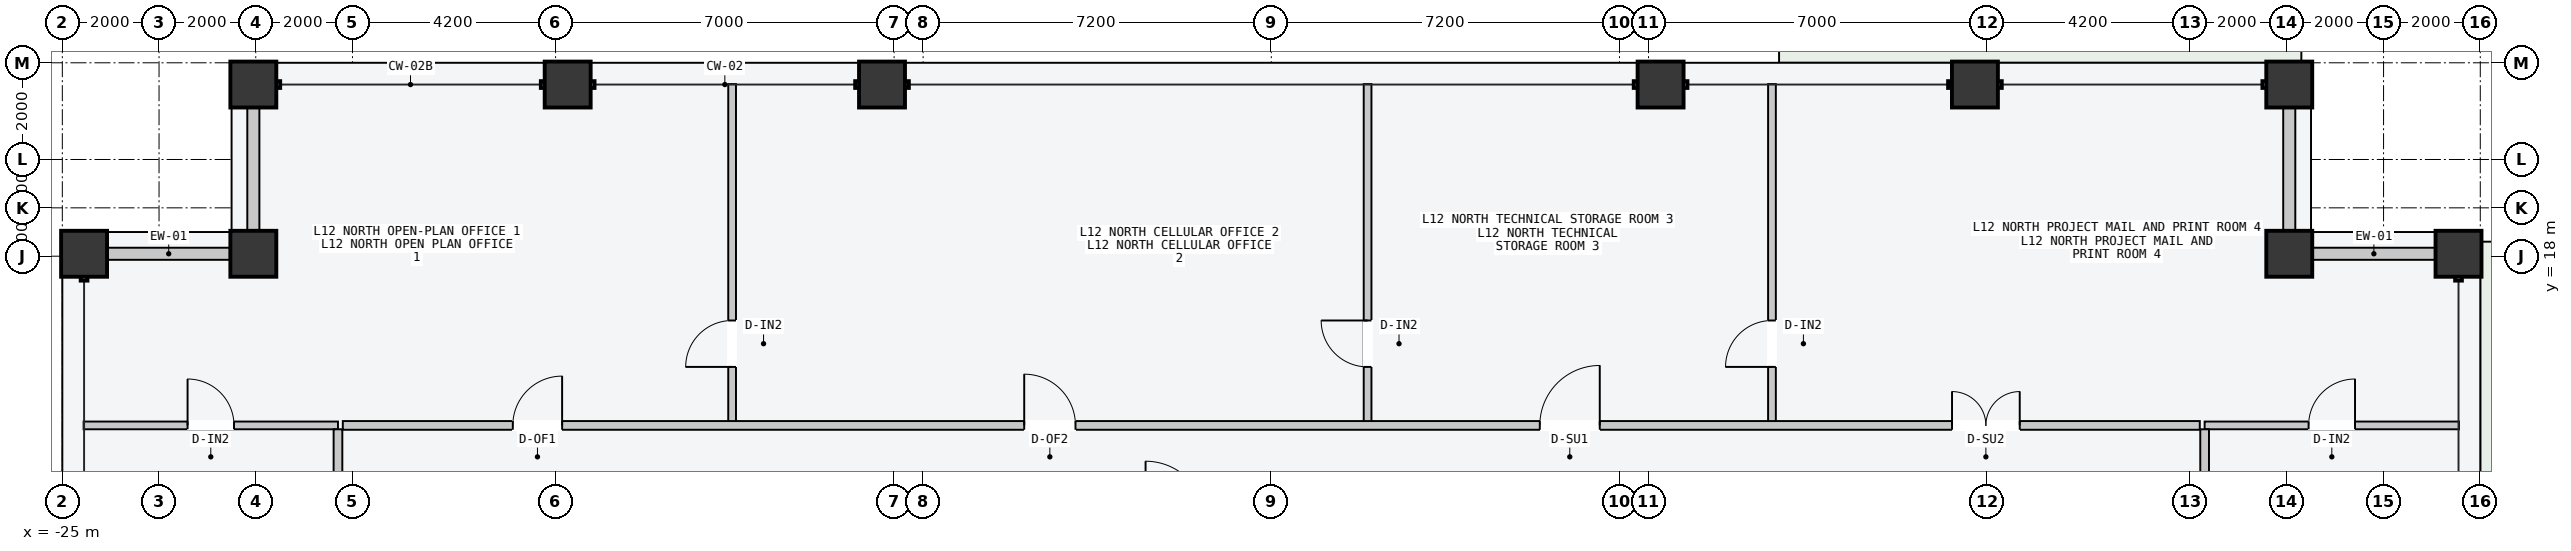
"""IFC4 building model, lengths in metres.
Left out: names, types, materials, properties, quantities, classifications, styles, units other than length and angle.
Written with IfcOpenShell. Run it as: python <this file> out.ifc"""

import sys

from ifc_helpers import new_model, si_unit, direction, frame, frame_2d, origin, origin_2d, place, context, subcontext, project, spatial, rectangle, hollow_rectangle, extrude, element, fill, save


model = new_model("IFC4")
c1 = context("Model", 3, precision=1e-05, world=origin(), true_north=direction((0.0, 1.0)))
c2 = subcontext(c1, "Body", "Model", "MODEL_VIEW")
j1 = project(units=[si_unit("LENGTHUNIT", "METRE"), si_unit("PLANEANGLEUNIT", "RADIAN")], contexts=[c1])
p1 = place(None, origin())
s1 = spatial("IfcSite", under=j1, at=p1, CompositionType="ELEMENT")
p2 = place(p1, origin())
s2 = spatial("IfcBuilding", under=s1, at=p2, CompositionType="ELEMENT")
p3 = place(p2, frame((0.0, 0.0, 49.2)))
s3 = spatial("IfcBuildingStorey", under=s2, at=p3, CompositionType="ELEMENT", Elevation=49.2)
for number, where, z_axis, x_axis in (
    (1, (-21.05, 21.55, 0.0), (0.0, 0.0, 1.0), (1.0, 0.0, 0.0)),
    (2, (-14.55, 21.55, 0.0), (0.0, 0.0, 1.0), (1.0, 0.0, 0.0)),
    (3, (-8.05, 21.55, 0.0), (0.0, 0.0, 1.0), (1.0, 0.0, 0.0)),
    (4, (8.05, 21.55, 0.0), (0.0, 0.0, 1.0), (1.0, 0.0, 0.0)),
    (5, (14.55, 21.55, 0.0), (0.0, 0.0, 1.0), (1.0, 0.0, 0.0)),
    (6, (21.05, 21.55, 0.0), (0.0, 0.0, 1.0), (1.0, 0.0, 0.0)),
    (7, (-24.55, 18.05, 0.0), (0.0, 0.0, 1.0), (0.0, 1.0, 0.0)),
    (8, (24.55, 18.05, 0.0), (0.0, 0.0, 1.0), (0.0, 1.0, 0.0)),
    (9, (-21.05, 18.05, 0.0), (0.0, 0.0, 1.0), (1.0, 0.0, 0.0)),
    (10, (21.05, 18.05, 0.0), (0.0, 0.0, 1.0), (1.0, 0.0, 0.0)),
):
    element("IfcColumn", number, at=place(p3, frame(where, z_axis=z_axis, x_axis=x_axis)), inside=s3, PredefinedType="COLUMN", context=c2, shape_type="SweptSolid", body=[
        extrude(hollow_rectangle(XDim=0.95, YDim=0.95, WallThickness=0.048, at=origin_2d()), origin(), (0.0, 0.0, 1.0), 3.6),
    ])
for number, where, z_axis, x_axis in (
    (11, (-24.065, 18.05, 0.0), (0.0, 0.0, 1.0), (1.0, 0.0, 0.0)),
    (12, (-21.05, 18.535, 0.0), (0.0, 0.0, 1.0), (0.0, 1.0, 0.0)),
    (13, (21.535, 18.05, 0.0), (0.0, 0.0, 1.0), (1.0, 0.0, 0.0)),
    (14, (21.05, 18.535, 0.0), (0.0, 0.0, 1.0), (0.0, 1.0, 0.0)),
):
    element("IfcWall", number, at=place(p3, frame(where, z_axis=z_axis, x_axis=x_axis)), inside=s3, PredefinedType="STANDARD", context=c2, shape_type="SweptSolid", body=[
        extrude(rectangle(XDim=2.53, YDim=0.25, at=frame_2d((1.265, 0.0))), origin(), (0.0, 0.0, 1.0), 2.7),
    ])
p4 = place(p3, frame((-11.15, 14.56, 0.0), z_axis=(0.0, 0.0, 1.0), x_axis=(0.0, 1.0, 0.0)))
e15 = element("IfcWall", 15, at=p4, inside=s3, PredefinedType="PARTITIONING", context=c2, shape_type="SweptSolid", body=[
    extrude(rectangle(XDim=7.0, YDim=0.16, at=frame_2d((3.5, 0.0))), origin(), (0.0, 0.0, 1.0), 3.4),
])
p5 = place(p4, frame((1.15, 0.0, 0.0)))
e16 = element("IfcOpeningElement", 16, at=p5, cuts=e15, PredefinedType="OPENING", context=c2, shape_type="SweptSolid", body=[
    extrude(rectangle(XDim=0.96, YDim=2.18, at=frame_2d((0.48, 1.09))), frame((0.0, 0.09, 0.0), z_axis=(0.0, -1.0, 0.0), x_axis=(1.0, 0.0, 0.0)), (0.0, 0.0, 1.0), 0.18),
])
p6 = place(p3, frame((1.991, 14.56, 0.0), z_axis=(0.0, 0.0, 1.0), x_axis=(0.0, 1.0, 0.0)))
e17 = element("IfcWall", 17, at=p6, inside=s3, PredefinedType="PARTITIONING", context=c2, shape_type="SweptSolid", body=[
    extrude(rectangle(XDim=7.0, YDim=0.16, at=frame_2d((3.5, 0.0))), origin(), (0.0, 0.0, 1.0), 3.4),
])
p7 = place(p6, frame((1.15, 0.0, 0.0)))
e18 = element("IfcOpeningElement", 18, at=p7, cuts=e17, PredefinedType="OPENING", context=c2, shape_type="SweptSolid", body=[
    extrude(rectangle(XDim=0.96, YDim=2.18, at=frame_2d((0.48, 1.09))), frame((0.0, 0.09, 0.0), z_axis=(0.0, -1.0, 0.0), x_axis=(1.0, 0.0, 0.0)), (0.0, 0.0, 1.0), 0.18),
])
p8 = place(p3, frame((10.353, 14.56, 0.0), z_axis=(0.0, 0.0, 1.0), x_axis=(0.0, 1.0, 0.0)))
e19 = element("IfcWall", 19, at=p8, inside=s3, PredefinedType="PARTITIONING", context=c2, shape_type="SweptSolid", body=[
    extrude(rectangle(XDim=7.0, YDim=0.16, at=frame_2d((3.5, 0.0))), origin(), (0.0, 0.0, 1.0), 3.4),
])
p9 = place(p8, frame((1.15, 0.0, 0.0)))
e20 = element("IfcOpeningElement", 20, at=p9, cuts=e19, PredefinedType="OPENING", context=c2, shape_type="SweptSolid", body=[
    extrude(rectangle(XDim=0.96, YDim=2.18, at=frame_2d((0.48, 1.09))), frame((0.0, 0.09, 0.0), z_axis=(0.0, -1.0, 0.0), x_axis=(1.0, 0.0, 0.0)), (0.0, 0.0, 1.0), 0.18),
])
p10 = place(p3, frame((-19.2, 14.5, 0.0), z_axis=(0.0, 0.0, 1.0), x_axis=(1.0, 0.0, 0.0)))
e21 = element("IfcWall", 21, at=p10, inside=s3, PredefinedType="PARTITIONING", context=c2, shape_type="SweptSolid", body=[
    extrude(rectangle(XDim=38.4, YDim=0.18, at=frame_2d((19.2, 0.0))), origin(), (0.0, 0.0, 1.0), 3.4),
])
p11 = place(p10, frame((3.515, 0.0, 0.0)))
e22 = element("IfcOpeningElement", 22, at=p11, cuts=e21, PredefinedType="OPENING", context=c2, shape_type="SweptSolid", body=[
    extrude(rectangle(XDim=1.02, YDim=2.2, at=frame_2d((0.51, 1.1))), frame((0.0, 0.1, 0.0), z_axis=(0.0, -1.0, 0.0), x_axis=(1.0, 0.0, 0.0)), (0.0, 0.0, 1.0), 0.2),
])
p12 = place(p10, frame((14.091, 0.0, 0.0)))
e23 = element("IfcOpeningElement", 23, at=p12, cuts=e21, PredefinedType="OPENING", context=c2, shape_type="SweptSolid", body=[
    extrude(rectangle(XDim=1.06, YDim=2.2, at=frame_2d((0.53, 1.1))), frame((0.0, 0.1, 0.0), z_axis=(0.0, -1.0, 0.0), x_axis=(1.0, 0.0, 0.0)), (0.0, 0.0, 1.0), 0.2),
])
p13 = place(p10, frame((24.752, 0.0, 0.0)))
e24 = element("IfcOpeningElement", 24, at=p13, cuts=e21, PredefinedType="OPENING", context=c2, shape_type="SweptSolid", body=[
    extrude(rectangle(XDim=1.24, YDim=2.24, at=frame_2d((0.62, 1.12))), frame((0.0, 0.1, 0.0), z_axis=(0.0, -1.0, 0.0), x_axis=(1.0, 0.0, 0.0)), (0.0, 0.0, 1.0), 0.2),
])
p14 = place(p10, frame((33.277, 0.0, 0.0)))
e25 = element("IfcOpeningElement", 25, at=p14, cuts=e21, PredefinedType="OPENING", context=c2, shape_type="SweptSolid", body=[
    extrude(rectangle(XDim=1.4, YDim=2.2, at=frame_2d((0.7, 1.1))), frame((0.0, 0.1, 0.0), z_axis=(0.0, -1.0, 0.0), x_axis=(1.0, 0.0, 0.0)), (0.0, 0.0, 1.0), 0.2),
])
p15 = place(p3, frame((-24.56, 14.5, 0.0), z_axis=(0.0, 0.0, 1.0), x_axis=(1.0, 0.0, 0.0)))
e26 = element("IfcWall", 26, at=p15, inside=s3, PredefinedType="PARTITIONING", context=c2, shape_type="SweptSolid", body=[
    extrude(rectangle(XDim=5.26, YDim=0.16, at=frame_2d((2.63, 0.0))), origin(), (0.0, 0.0, 1.0), 3.4),
])
p16 = place(p15, frame((2.15, 0.0, 0.0)))
e27 = element("IfcOpeningElement", 27, at=p16, cuts=e26, PredefinedType="OPENING", context=c2, shape_type="SweptSolid", body=[
    extrude(rectangle(XDim=0.96, YDim=2.18, at=frame_2d((0.48, 1.09))), frame((0.0, 0.09, 0.0), z_axis=(0.0, -1.0, 0.0), x_axis=(1.0, 0.0, 0.0)), (0.0, 0.0, 1.0), 0.18),
])
p17 = place(p3, frame((19.3, 14.5, 0.0), z_axis=(0.0, 0.0, 1.0), x_axis=(1.0, 0.0, 0.0)))
e28 = element("IfcWall", 28, at=p17, inside=s3, PredefinedType="PARTITIONING", context=c2, shape_type="SweptSolid", body=[
    extrude(rectangle(XDim=5.26, YDim=0.16, at=frame_2d((2.63, 0.0))), origin(), (0.0, 0.0, 1.0), 3.4),
])
p18 = place(p17, frame((2.15, 0.0, 0.0)))
e29 = element("IfcOpeningElement", 29, at=p18, cuts=e28, PredefinedType="OPENING", context=c2, shape_type="SweptSolid", body=[
    extrude(rectangle(XDim=0.96, YDim=2.18, at=frame_2d((0.48, 1.09))), frame((0.0, 0.09, 0.0), z_axis=(0.0, -1.0, 0.0), x_axis=(1.0, 0.0, 0.0)), (0.0, 0.0, 1.0), 0.18),
])
p19 = place(p3, frame((-19.3, -12.12, 0.0), z_axis=(0.0, 0.0, 1.0), x_axis=(0.0, 1.0, 0.0)))
e30 = element("IfcWall", 30, at=p19, inside=s3, PredefinedType="PARTITIONING", context=c2, shape_type="SweptSolid", body=[
    extrude(rectangle(XDim=26.54, YDim=0.18, at=frame_2d((13.27, 0.0))), origin(), (0.0, 0.0, 1.0), 3.4),
])
p20 = place(p19, frame((5.309, 0.0, 0.0)))
e31 = element("IfcOpeningElement", 31, at=p20, cuts=e30, PredefinedType="OPENING", context=c2, shape_type="SweptSolid", body=[
    extrude(rectangle(XDim=1.06, YDim=2.2, at=frame_2d((0.53, 1.1))), frame((0.0, 0.1, 0.0), z_axis=(0.0, -1.0, 0.0), x_axis=(1.0, 0.0, 0.0)), (0.0, 0.0, 1.0), 0.2),
])
p21 = place(p19, frame((15.171, 0.0, 0.0)))
e32 = element("IfcOpeningElement", 32, at=p21, cuts=e30, PredefinedType="OPENING", context=c2, shape_type="SweptSolid", body=[
    extrude(rectangle(XDim=1.24, YDim=2.24, at=frame_2d((0.62, 1.12))), frame((0.0, 0.1, 0.0), z_axis=(0.0, -1.0, 0.0), x_axis=(1.0, 0.0, 0.0)), (0.0, 0.0, 1.0), 0.2),
])
p22 = place(p19, frame((22.522, 0.0, 0.0)))
e33 = element("IfcOpeningElement", 33, at=p22, cuts=e30, PredefinedType="OPENING", context=c2, shape_type="SweptSolid", body=[
    extrude(rectangle(XDim=1.4, YDim=2.2, at=frame_2d((0.7, 1.1))), frame((0.0, 0.1, 0.0), z_axis=(0.0, -1.0, 0.0), x_axis=(1.0, 0.0, 0.0)), (0.0, 0.0, 1.0), 0.2),
])
p23 = place(p3, frame((19.3, -12.12, 0.0), z_axis=(0.0, 0.0, 1.0), x_axis=(0.0, 1.0, 0.0)))
e34 = element("IfcWall", 34, at=p23, inside=s3, PredefinedType="PARTITIONING", context=c2, shape_type="SweptSolid", body=[
    extrude(rectangle(XDim=26.54, YDim=0.18, at=frame_2d((13.27, 0.0))), origin(), (0.0, 0.0, 1.0), 3.4),
])
p24 = place(p23, frame((5.043, 0.0, 0.0)))
e35 = element("IfcOpeningElement", 35, at=p24, cuts=e34, PredefinedType="OPENING", context=c2, shape_type="SweptSolid", body=[
    extrude(rectangle(XDim=1.06, YDim=2.2, at=frame_2d((0.53, 1.1))), frame((0.0, 0.1, 0.0), z_axis=(0.0, -1.0, 0.0), x_axis=(1.0, 0.0, 0.0)), (0.0, 0.0, 1.0), 0.2),
])
p25 = place(p23, frame((18.223, 0.0, 0.0)))
e36 = element("IfcOpeningElement", 36, at=p25, cuts=e34, PredefinedType="OPENING", context=c2, shape_type="SweptSolid", body=[
    extrude(rectangle(XDim=1.24, YDim=2.24, at=frame_2d((0.62, 1.12))), frame((0.0, 0.1, 0.0), z_axis=(0.0, -1.0, 0.0), x_axis=(1.0, 0.0, 0.0)), (0.0, 0.0, 1.0), 0.2),
])
p26 = place(p5, origin())
e37 = element("IfcDoor", 37, at=p26, inside=s3, OperationType="SINGLE_SWING_LEFT", PredefinedType="DOOR", context=c2, shape_type="SweptSolid", body=[
    extrude(rectangle(XDim=0.96, YDim=2.18, at=frame_2d((0.48, 1.09))), frame((0.0, 0.025, 0.0), z_axis=(0.0, -1.0, 0.0), x_axis=(1.0, 0.0, 0.0)), (0.0, 0.0, 1.0), 0.05),
])
fill(e16, e37)
p27 = place(p7, origin())
e38 = element("IfcDoor", 38, at=p27, inside=s3, OperationType="SINGLE_SWING_RIGHT", PredefinedType="DOOR", context=c2, shape_type="SweptSolid", body=[
    extrude(rectangle(XDim=0.96, YDim=2.18, at=frame_2d((0.48, 1.09))), frame((0.0, 0.025, 0.0), z_axis=(0.0, -1.0, 0.0), x_axis=(1.0, 0.0, 0.0)), (0.0, 0.0, 1.0), 0.05),
])
fill(e18, e38)
p28 = place(p9, origin())
e39 = element("IfcDoor", 39, at=p28, inside=s3, OperationType="SINGLE_SWING_LEFT", PredefinedType="DOOR", context=c2, shape_type="SweptSolid", body=[
    extrude(rectangle(XDim=0.96, YDim=2.18, at=frame_2d((0.48, 1.09))), frame((0.0, 0.025, 0.0), z_axis=(0.0, -1.0, 0.0), x_axis=(1.0, 0.0, 0.0)), (0.0, 0.0, 1.0), 0.05),
])
fill(e20, e39)
p29 = place(p11, origin())
e40 = element("IfcDoor", 40, at=p29, inside=s3, OperationType="SINGLE_SWING_RIGHT", PredefinedType="DOOR", context=c2, shape_type="SweptSolid", body=[
    extrude(rectangle(XDim=1.02, YDim=2.2, at=frame_2d((0.51, 1.1))), frame((0.0, 0.025, 0.0), z_axis=(0.0, -1.0, 0.0), x_axis=(1.0, 0.0, 0.0)), (0.0, 0.0, 1.0), 0.05),
])
fill(e22, e40)
p30 = place(p12, origin())
e41 = element("IfcDoor", 41, at=p30, inside=s3, OperationType="SINGLE_SWING_LEFT", PredefinedType="DOOR", context=c2, shape_type="SweptSolid", body=[
    extrude(rectangle(XDim=1.06, YDim=2.2, at=frame_2d((0.53, 1.1))), frame((0.0, 0.025, 0.0), z_axis=(0.0, -1.0, 0.0), x_axis=(1.0, 0.0, 0.0)), (0.0, 0.0, 1.0), 0.05),
])
fill(e23, e41)
p31 = place(p13, origin())
e42 = element("IfcDoor", 42, at=p31, inside=s3, OperationType="SINGLE_SWING_RIGHT", PredefinedType="DOOR", context=c2, shape_type="SweptSolid", body=[
    extrude(rectangle(XDim=1.24, YDim=2.24, at=frame_2d((0.62, 1.12))), frame((0.0, 0.025, 0.0), z_axis=(0.0, -1.0, 0.0), x_axis=(1.0, 0.0, 0.0)), (0.0, 0.0, 1.0), 0.05),
])
fill(e24, e42)
p32 = place(p14, origin())
e43 = element("IfcDoor", 43, at=p32, inside=s3, OperationType="DOUBLE_DOOR_SINGLE_SWING", PredefinedType="DOOR", context=c2, shape_type="SweptSolid", body=[
    extrude(rectangle(XDim=1.4, YDim=2.2, at=frame_2d((0.7, 1.1))), frame((0.0, 0.025, 0.0), z_axis=(0.0, -1.0, 0.0), x_axis=(1.0, 0.0, 0.0)), (0.0, 0.0, 1.0), 0.05),
])
fill(e25, e43)
p33 = place(p16, origin())
e44 = element("IfcDoor", 44, at=p33, inside=s3, OperationType="SINGLE_SWING_LEFT", PredefinedType="DOOR", context=c2, shape_type="SweptSolid", body=[
    extrude(rectangle(XDim=0.96, YDim=2.18, at=frame_2d((0.48, 1.09))), frame((0.0, 0.025, 0.0), z_axis=(0.0, -1.0, 0.0), x_axis=(1.0, 0.0, 0.0)), (0.0, 0.0, 1.0), 0.05),
])
fill(e27, e44)
p34 = place(p18, origin())
e45 = element("IfcDoor", 45, at=p34, inside=s3, OperationType="SINGLE_SWING_RIGHT", PredefinedType="DOOR", context=c2, shape_type="SweptSolid", body=[
    extrude(rectangle(XDim=0.96, YDim=2.18, at=frame_2d((0.48, 1.09))), frame((0.0, 0.025, 0.0), z_axis=(0.0, -1.0, 0.0), x_axis=(1.0, 0.0, 0.0)), (0.0, 0.0, 1.0), 0.05),
])
fill(e29, e45)
save(model, sys.argv[1])
